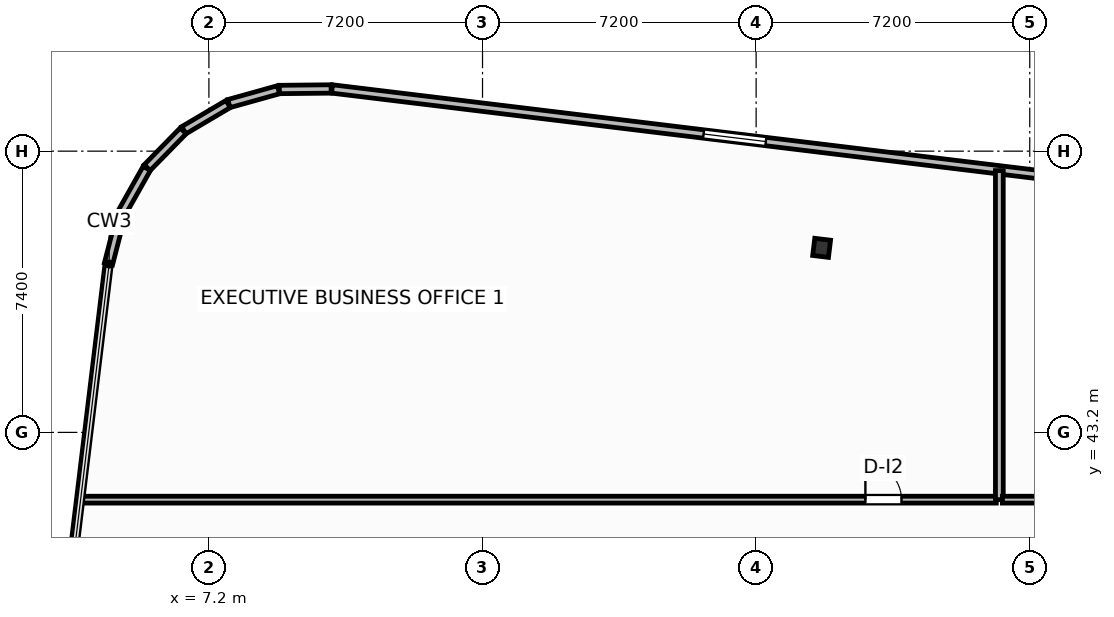
"""IFC4 building model, lengths in metres.
Left out: names, types, materials, properties, quantities, classifications, styles, units other than length and angle.
Written with IfcOpenShell. Run it as: python <this file> out.ifc"""

import sys

from ifc_helpers import new_model, si_unit, direction, frame, frame_2d, origin, origin_2d, place, context, subcontext, project, spatial, rectangle, i_section, extrude, element, fill, save


model = new_model("IFC4")
c1 = context("Model", 3, precision=1e-05, world=origin(), true_north=direction((0.0, 1.0)))
c2 = subcontext(c1, "Body", "Model", "MODEL_VIEW")
j1 = project(units=[si_unit("LENGTHUNIT", "METRE"), si_unit("PLANEANGLEUNIT", "RADIAN")], contexts=[c1])
p1 = place(None, origin())
s1 = spatial("IfcSite", under=j1, at=p1, CompositionType="ELEMENT")
p2 = place(p1, origin())
s2 = spatial("IfcBuilding", under=s1, at=p2, CompositionType="ELEMENT")
p3 = place(p2, frame((0.0, 0.0, 136.5)))
s3 = spatial("IfcBuildingStorey", under=s2, at=p3, CompositionType="ELEMENT", Elevation=136.5)
p4 = place(p3, frame((23.323, 48.056, 0.0), z_axis=(0.0, 0.0, 1.0), x_axis=(0.992732158755, -0.12034475881, 0.0)))
e1 = element("IfcColumn", 1, at=p4, inside=s3, PredefinedType="COLUMN", context=c2, shape_type="SweptSolid", body=[
    extrude(i_section(OverallWidth=0.418, OverallDepth=0.455, WebThickness=0.042, FlangeThickness=0.068, FilletRadius=0.025, at=origin_2d()), origin(), (0.0, 0.0, 1.0), 3.7),
])
p5 = place(p3, frame((31.633, 49.668, 0.0), z_axis=(0.0, 0.0, 1.0), x_axis=(-0.992731670483, 0.120348786531, 0.0)))
e2 = element("IfcWall", 2, at=p5, inside=s3, PredefinedType="SOLIDWALL", context=c2, shape_type="SweptSolid", body=[
    extrude(rectangle(XDim=21.347, YDim=0.22, at=frame_2d((10.674, 0.0))), origin(), (0.0, 0.0, 1.0), 2.73),
])
p6 = place(p5, frame((9.849, 0.0, 0.8)))
e3 = element("IfcOpeningElement", 3, at=p6, cuts=e2, PredefinedType="OPENING", context=c2, shape_type="SweptSolid", body=[
    extrude(rectangle(XDim=1.65, YDim=1.65, at=frame_2d((0.825, 0.825))), frame((0.0, 0.12, 0.0), z_axis=(0.0, -1.0, 0.0), x_axis=(1.0, 0.0, 0.0)), (0.0, 0.0, 1.0), 0.24),
])
p7 = place(p3, frame((10.416, 52.237, 0.0), z_axis=(0.0, 0.0, 1.0), x_axis=(-0.999947718056, -0.010225514878, 0.0)))
e4 = element("IfcWall", 4, at=p7, inside=s3, PredefinedType="SOLIDWALL", context=c2, shape_type="SweptSolid", body=[
    extrude(rectangle(XDim=1.361, YDim=0.22, at=frame_2d((0.68, 0.0))), origin(), (0.0, 0.0, 1.0), 2.73),
])
for number, where, z_axis, x_axis in (
    (5, (9.031, 52.216, 0.0), (0.0, 0.0, 1.0), (-0.963, -0.269, 0.0)),
    (6, (7.706, 51.84, 0.0), (0.0, 0.0, 1.0), (-0.861, -0.509, 0.0)),
):
    element("IfcWall", number, at=place(p3, frame(where, z_axis=z_axis, x_axis=x_axis)), inside=s3, PredefinedType="SOLIDWALL", context=c2, shape_type="SweptSolid", body=[
        extrude(rectangle(XDim=1.353, YDim=0.22, at=frame_2d((0.677, 0.0))), origin(), (0.0, 0.0, 1.0), 2.73),
    ])
p8 = place(p3, frame((6.523, 51.133, 0.0), z_axis=(0.0, 0.0, 1.0), x_axis=(-0.699762925925, -0.714375144795, 0.0)))
e7 = element("IfcWall", 7, at=p8, inside=s3, PredefinedType="SOLIDWALL", context=c2, shape_type="SweptSolid", body=[
    extrude(rectangle(XDim=1.353, YDim=0.22, at=frame_2d((0.677, 0.0))), origin(), (0.0, 0.0, 1.0), 2.73),
])
p9 = place(p3, frame((5.564, 50.145, 0.0), z_axis=(0.0, 0.0, 1.0), x_axis=(-0.491117621399, -0.871093268227, 0.0)))
e8 = element("IfcWall", 8, at=p9, inside=s3, PredefinedType="SOLIDWALL", context=c2, shape_type="SweptSolid", body=[
    extrude(rectangle(XDim=1.353, YDim=0.22, at=frame_2d((0.677, 0.0))), origin(), (0.0, 0.0, 1.0), 2.73),
])
p10 = place(p3, frame((4.894, 48.942, 0.0), z_axis=(0.0, 0.0, 1.0), x_axis=(-0.248857256909, -0.968540172468, 0.0)))
e9 = element("IfcWall", 9, at=p10, inside=s3, PredefinedType="SOLIDWALL", context=c2, shape_type="SweptSolid", body=[
    extrude(rectangle(XDim=1.353, YDim=0.22, at=frame_2d((0.676, 0.0))), origin(), (0.0, 0.0, 1.0), 2.73),
])
p11 = place(p3, frame((3.864, 41.43, 0.0), z_axis=(0.0, 0.0, 1.0), x_axis=(1.0, 0.0, 0.0)))
e10 = element("IfcWall", 10, at=p11, inside=s3, PredefinedType="PARTITIONING", context=c2, shape_type="SweptSolid", body=[
    extrude(rectangle(XDim=24.056, YDim=0.18, at=frame_2d((12.028, 0.0))), origin(), (0.0, 0.0, 1.0), 3.45),
])
p12 = place(p11, frame((20.611, 0.0, 0.0)))
e11 = element("IfcOpeningElement", 11, at=p12, cuts=e10, PredefinedType="OPENING", context=c2, shape_type="SweptSolid", body=[
    extrude(rectangle(XDim=0.95, YDim=2.05, at=frame_2d((0.475, 1.025))), frame((0.0, 0.1, 0.0), z_axis=(0.0, -1.0, 0.0), x_axis=(1.0, 0.0, 0.0)), (0.0, 0.0, 1.0), 0.2),
])
p13 = place(p3, frame((28.0, 41.43, 0.0), z_axis=(0.0, 0.0, 1.0), x_axis=(0.0, 1.0, 0.0)))
e12 = element("IfcWall", 12, at=p13, inside=s3, PredefinedType="PARTITIONING", context=c2, shape_type="SweptSolid", body=[
    extrude(rectangle(XDim=8.658, YDim=0.205, at=frame_2d((4.329, 0.0))), origin(), (0.0, 0.0, 1.0), 3.45),
])
p14 = place(p3, frame((28.08, 41.43, 0.0), z_axis=(0.0, 0.0, 1.0), x_axis=(1.0, 0.0, 0.0)))
e13 = element("IfcWall", 13, at=p14, inside=s3, PredefinedType="PARTITIONING", context=c2, shape_type="SweptSolid", body=[
    extrude(rectangle(XDim=13.84, YDim=0.18, at=frame_2d((6.92, 0.0))), origin(), (0.0, 0.0, 1.0), 3.45),
])
p15 = place(p14, frame((6.445, 0.0, 0.0)))
e14 = element("IfcOpeningElement", 14, at=p15, cuts=e13, PredefinedType="OPENING", context=c2, shape_type="SweptSolid", body=[
    extrude(rectangle(XDim=0.95, YDim=2.05, at=frame_2d((0.475, 1.025))), frame((0.0, 0.1, 0.0), z_axis=(0.0, -1.0, 0.0), x_axis=(1.0, 0.0, 0.0)), (0.0, 0.0, 1.0), 0.2),
])
p16 = place(p6, origin())
e15 = element("IfcWindow", 15, at=p16, inside=s3, PartitioningType="SINGLE_PANEL", PredefinedType="WINDOW", context=c2, shape_type="SweptSolid", body=[
    extrude(rectangle(XDim=1.65, YDim=1.65, at=frame_2d((0.825, 0.825))), frame((0.0, 0.03, 0.0), z_axis=(0.0, -1.0, 0.0), x_axis=(1.0, 0.0, 0.0)), (0.0, 0.0, 1.0), 0.06),
])
fill(e3, e15)
p17 = place(p12, origin())
e16 = element("IfcDoor", 16, at=p17, inside=s3, OperationType="SINGLE_SWING_LEFT", PredefinedType="DOOR", context=c2, shape_type="SweptSolid", body=[
    extrude(rectangle(XDim=0.95, YDim=2.05, at=frame_2d((0.475, 1.025))), frame((0.0, 0.025, 0.0), z_axis=(0.0, -1.0, 0.0), x_axis=(1.0, 0.0, 0.0)), (0.0, 0.0, 1.0), 0.05),
])
fill(e11, e16)
save(model, sys.argv[1])
